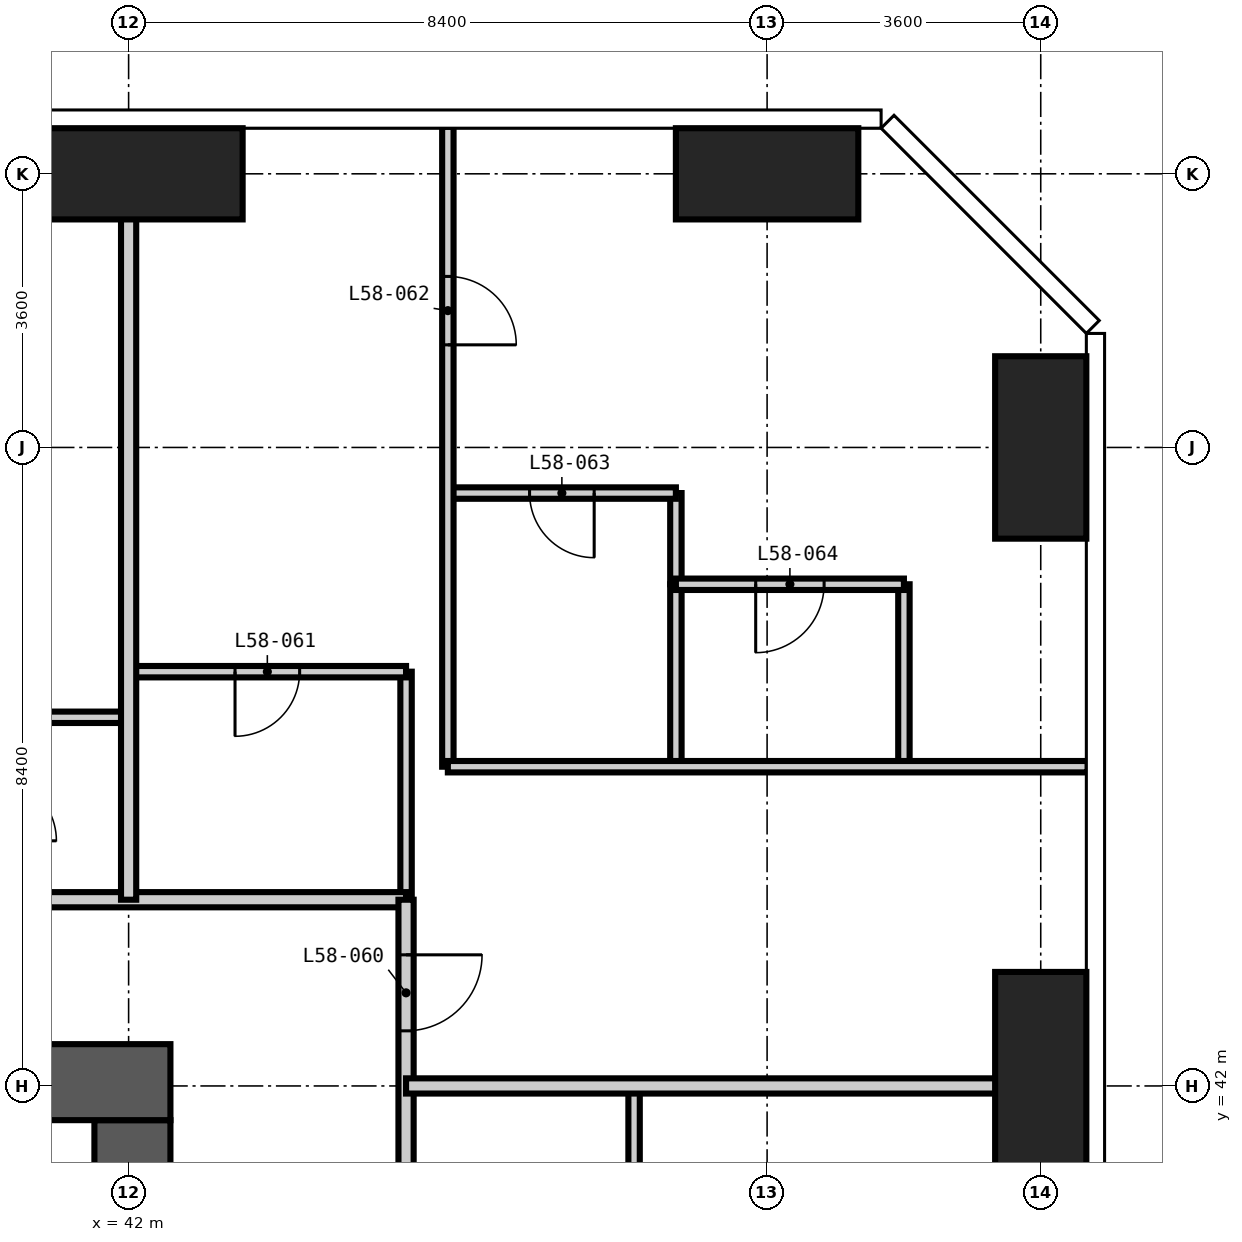
"""IFC4 building model, lengths in metres.
Left out: names, types, materials, properties, quantities, classifications, styles, units other than length and angle.
Written with IfcOpenShell. Run it as: python <this file> out.ifc"""

import sys

from ifc_helpers import new_model, si_unit, direction, frame, frame_2d, origin, origin_2d, place, context, subcontext, project, spatial, rectangle, extrude, element, fill, save


model = new_model("IFC4")
c1 = context("Model", 3, precision=1e-05, world=origin(), true_north=direction((0.0, 1.0)))
c2 = subcontext(c1, "Body", "Model", "MODEL_VIEW")
j1 = project(units=[si_unit("LENGTHUNIT", "METRE"), si_unit("PLANEANGLEUNIT", "RADIAN")], contexts=[c1])
p1 = place(None, origin())
s1 = spatial("IfcSite", under=j1, at=p1, CompositionType="ELEMENT")
p2 = place(p1, origin())
s2 = spatial("IfcBuilding", under=s1, at=p2, CompositionType="ELEMENT")
p3 = place(p2, frame((0.0, 0.0, 225.6)))
s3 = spatial("IfcBuildingStorey", under=s2, at=p3, CompositionType="ELEMENT", Elevation=225.6)
p4 = place(p3, frame((42.0, 54.0, -0.35), z_axis=(0.0, 0.0, 1.0), x_axis=(1.0, 0.0, 0.0)))
e1 = element("IfcColumn", 1, at=p4, inside=s3, PredefinedType="COLUMN", context=c2, shape_type="SweptSolid", body=[
    extrude(rectangle(XDim=3.0, YDim=1.2, at=origin_2d()), origin(), (0.0, 0.0, 1.0), 3.9),
])
p5 = place(p3, frame((50.4, 54.0, -0.35), z_axis=(0.0, 0.0, 1.0), x_axis=(1.0, 0.0, 0.0)))
e2 = element("IfcColumn", 2, at=p5, inside=s3, PredefinedType="COLUMN", context=c2, shape_type="SweptSolid", body=[
    extrude(rectangle(XDim=2.4, YDim=1.2, at=origin_2d()), origin(), (0.0, 0.0, 1.0), 3.9),
])
p6 = place(p3, frame((54.0, 42.0, -0.35), z_axis=(0.0, 0.0, 1.0), x_axis=(1.0, 0.0, 0.0)))
e3 = element("IfcColumn", 3, at=p6, inside=s3, PredefinedType="COLUMN", context=c2, shape_type="SweptSolid", body=[
    extrude(rectangle(XDim=1.2, YDim=3.0, at=origin_2d()), origin(), (0.0, 0.0, 1.0), 3.9),
])
p7 = place(p3, frame((54.0, 50.4, -0.35), z_axis=(0.0, 0.0, 1.0), x_axis=(1.0, 0.0, 0.0)))
e4 = element("IfcColumn", 4, at=p7, inside=s3, PredefinedType="COLUMN", context=c2, shape_type="SweptSolid", body=[
    extrude(rectangle(XDim=1.2, YDim=2.4, at=origin_2d()), origin(), (0.0, 0.0, 1.0), 3.9),
])
p8 = place(p3, frame((42.05, 17.25, -0.35), z_axis=(0.0, 0.0, 1.0), x_axis=(0.0, 1.0, 0.0)))
e5 = element("IfcWall", 5, at=p8, inside=s3, PredefinedType="SHEAR", context=c2, shape_type="SweptSolid", body=[
    extrude(rectangle(XDim=24.3, YDim=1.0, at=frame_2d((12.15, 0.0))), origin(), (0.0, 0.0, 1.0), 3.9),
])
p9 = place(p8, frame((0.35, 0.0, 0.35)))
e6 = element("IfcOpeningElement", 6, at=p9, cuts=e5, PredefinedType="OPENING", context=c2, shape_type="SweptSolid", body=[
    extrude(rectangle(XDim=1.2, YDim=2.2, at=frame_2d((0.6, 1.1))), frame((0.0, 0.51, 0.0), z_axis=(0.0, -1.0, 0.0), x_axis=(1.0, 0.0, 0.0)), (0.0, 0.0, 1.0), 1.02),
])
p10 = place(p8, frame((11.25, 0.0, 0.35)))
e7 = element("IfcOpeningElement", 7, at=p10, cuts=e5, PredefinedType="OPENING", context=c2, shape_type="SweptSolid", body=[
    extrude(rectangle(XDim=1.8, YDim=2.2, at=frame_2d((0.9, 1.1))), frame((0.0, 0.51, 0.0), z_axis=(0.0, -1.0, 0.0), x_axis=(1.0, 0.0, 0.0)), (0.0, 0.0, 1.0), 1.02),
])
p11 = place(p8, frame((20.05, 0.0, 0.35)))
e8 = element("IfcOpeningElement", 8, at=p11, cuts=e5, PredefinedType="OPENING", context=c2, shape_type="SweptSolid", body=[
    extrude(rectangle(XDim=1.0, YDim=2.1, at=frame_2d((0.5, 1.05))), frame((0.0, 0.51, 0.0), z_axis=(0.0, -1.0, 0.0), x_axis=(1.0, 0.0, 0.0)), (0.0, 0.0, 1.0), 1.02),
])
p12 = place(p3, frame((42.55, 42.05, -0.35), z_axis=(0.0, 0.0, 1.0), x_axis=(-1.0, 0.0, 0.0)))
e9 = element("IfcWall", 9, at=p12, inside=s3, PredefinedType="SHEAR", context=c2, shape_type="SweptSolid", body=[
    extrude(rectangle(XDim=18.125, YDim=1.0, at=frame_2d((9.062, 0.0))), origin(), (0.0, 0.0, 1.0), 3.9),
])
p13 = place(p12, frame((10.45, 0.0, 0.35)))
e10 = element("IfcOpeningElement", 10, at=p13, cuts=e9, PredefinedType="OPENING", context=c2, shape_type="SweptSolid", body=[
    extrude(rectangle(XDim=1.2, YDim=2.2, at=frame_2d((0.6, 1.1))), frame((0.0, 0.51, 0.0), z_axis=(0.0, -1.0, 0.0), x_axis=(1.0, 0.0, 0.0)), (0.0, 0.0, 1.0), 1.02),
])
p14 = place(p3, frame((45.65, 44.45, 0.0), z_axis=(0.0, 0.0, 1.0), x_axis=(0.0, 1.0, 0.0)))
e11 = element("IfcWall", 11, at=p14, inside=s3, PredefinedType="PARTITIONING", context=c2, shape_type="SweptSolid", body=[
    extrude(rectangle(XDim=3.0, YDim=0.15, at=frame_2d((1.5, 0.0))), origin(), (0.0, 0.0, 1.0), 3.55),
])
p15 = place(p3, frame((48.65, 39.6, 0.0), z_axis=(0.0, 0.0, 1.0), x_axis=(0.0, 1.0, 0.0)))
e12 = element("IfcWall", 12, at=p15, inside=s3, PredefinedType="PARTITIONING", context=c2, shape_type="SweptSolid", body=[
    extrude(rectangle(XDim=2.4, YDim=0.15, at=frame_2d((1.2, 0.0))), origin(), (0.0, 0.0, 1.0), 3.55),
])
p16 = place(p3, frame((49.2, 48.6, 0.0), z_axis=(0.0, 0.0, 1.0), x_axis=(0.0, 1.0, 0.0)))
e13 = element("IfcWall", 13, at=p16, inside=s3, PredefinedType="PARTITIONING", context=c2, shape_type="SweptSolid", body=[
    extrude(rectangle(XDim=1.2, YDim=0.15, at=frame_2d((0.6, 0.0))), origin(), (0.0, 0.0, 1.0), 3.55),
])
p17 = place(p3, frame((40.2, 46.85, 0.0), z_axis=(0.0, 0.0, 1.0), x_axis=(1.0, 0.0, 0.0)))
e14 = element("IfcWall", 14, at=p17, inside=s3, PredefinedType="PARTITIONING", context=c2, shape_type="SweptSolid", body=[
    extrude(rectangle(XDim=1.8, YDim=0.15, at=frame_2d((0.9, 0.0))), origin(), (0.0, 0.0, 1.0), 3.55),
])
p18 = place(p3, frame((42.0, 47.45, 0.0), z_axis=(0.0, 0.0, 1.0), x_axis=(1.0, 0.0, 0.0)))
e15 = element("IfcWall", 15, at=p18, inside=s3, PredefinedType="PARTITIONING", context=c2, shape_type="SweptSolid", body=[
    extrude(rectangle(XDim=3.65, YDim=0.15, at=frame_2d((1.825, 0.0))), origin(), (0.0, 0.0, 1.0), 3.55),
])
p19 = place(p18, frame((1.4, 0.0, 0.0)))
e16 = element("IfcOpeningElement", 16, at=p19, cuts=e15, PredefinedType="OPENING", context=c2, shape_type="SweptSolid", body=[
    extrude(rectangle(XDim=0.85, YDim=2.1, at=frame_2d((0.425, 1.05))), frame((0.0, 0.085, 0.0), z_axis=(0.0, -1.0, 0.0), x_axis=(1.0, 0.0, 0.0)), (0.0, 0.0, 1.0), 0.17),
])
p20 = place(p3, frame((46.2, 49.8, 0.0), z_axis=(0.0, 0.0, 1.0), x_axis=(1.0, 0.0, 0.0)))
e17 = element("IfcWall", 17, at=p20, inside=s3, PredefinedType="PARTITIONING", context=c2, shape_type="SweptSolid", body=[
    extrude(rectangle(XDim=3.0, YDim=0.15, at=frame_2d((1.5, 0.0))), origin(), (0.0, 0.0, 1.0), 3.55),
])
p21 = place(p20, frame((1.075, 0.0, 0.0)))
e18 = element("IfcOpeningElement", 18, at=p21, cuts=e17, PredefinedType="OPENING", context=c2, shape_type="SweptSolid", body=[
    extrude(rectangle(XDim=0.85, YDim=2.1, at=frame_2d((0.425, 1.05))), frame((0.0, 0.085, 0.0), z_axis=(0.0, -1.0, 0.0), x_axis=(1.0, 0.0, 0.0)), (0.0, 0.0, 1.0), 0.17),
])
p22 = place(p3, frame((21.925, 44.45, 0.0), z_axis=(0.0, 0.0, 1.0), x_axis=(1.0, 0.0, 0.0)))
e19 = element("IfcWall", 19, at=p22, inside=s3, PredefinedType="PARTITIONING", context=c2, shape_type="SweptSolid", body=[
    extrude(rectangle(XDim=23.725, YDim=0.2, at=frame_2d((11.862, 0.0))), origin(), (0.0, 0.0, 1.0), 3.55),
])
p23 = place(p22, frame((5.775, 0.0, 0.0)))
e20 = element("IfcOpeningElement", 20, at=p23, cuts=e19, PredefinedType="OPENING", context=c2, shape_type="SweptSolid", body=[
    extrude(rectangle(XDim=1.0, YDim=2.2, at=frame_2d((0.5, 1.1))), frame((0.0, 0.11, 0.0), z_axis=(0.0, -1.0, 0.0), x_axis=(1.0, 0.0, 0.0)), (0.0, 0.0, 1.0), 0.22),
])
p24 = place(p22, frame((16.575, 0.0, 0.0)))
e21 = element("IfcOpeningElement", 21, at=p24, cuts=e19, PredefinedType="OPENING", context=c2, shape_type="SweptSolid", body=[
    extrude(rectangle(XDim=1.0, YDim=2.2, at=frame_2d((0.5, 1.1))), frame((0.0, 0.11, 0.0), z_axis=(0.0, -1.0, 0.0), x_axis=(1.0, 0.0, 0.0)), (0.0, 0.0, 1.0), 0.22),
])
p25 = place(p3, frame((45.65, 44.45, 0.0), z_axis=(0.0, 0.0, 1.0), x_axis=(0.0, -1.0, 0.0)))
e22 = element("IfcWall", 22, at=p25, inside=s3, PredefinedType="PARTITIONING", context=c2, shape_type="SweptSolid", body=[
    extrude(rectangle(XDim=15.05, YDim=0.2, at=frame_2d((7.525, 0.0))), origin(), (0.0, 0.0, 1.0), 3.55),
])
p26 = place(p25, frame((8.25, 0.0, 0.0)))
e23 = element("IfcOpeningElement", 23, at=p26, cuts=e22, PredefinedType="OPENING", context=c2, shape_type="SweptSolid", body=[
    extrude(rectangle(XDim=1.0, YDim=2.2, at=frame_2d((0.5, 1.1))), frame((0.0, 0.11, 0.0), z_axis=(0.0, -1.0, 0.0), x_axis=(1.0, 0.0, 0.0)), (0.0, 0.0, 1.0), 0.22),
])
p27 = place(p25, frame((0.725, 0.0, 0.0)))
e24 = element("IfcOpeningElement", 24, at=p27, cuts=e22, PredefinedType="OPENING", context=c2, shape_type="SweptSolid", body=[
    extrude(rectangle(XDim=1.0, YDim=2.2, at=frame_2d((0.5, 1.1))), frame((0.0, 0.11, 0.0), z_axis=(0.0, -1.0, 0.0), x_axis=(1.0, 0.0, 0.0)), (0.0, 0.0, 1.0), 0.22),
])
p28 = place(p3, frame((42.0, 44.45, 0.0), z_axis=(0.0, 0.0, 1.0), x_axis=(0.0, 1.0, 0.0)))
e25 = element("IfcWall", 25, at=p28, inside=s3, PredefinedType="PARTITIONING", context=c2, shape_type="SweptSolid", body=[
    extrude(rectangle(XDim=10.168, YDim=0.2, at=frame_2d((5.084, 0.0))), origin(), (0.0, 0.0, 1.0), 3.55),
])
p29 = place(p3, frame((45.65, 42.0, 0.0), z_axis=(0.0, 0.0, 1.0), x_axis=(1.0, 0.0, 0.0)))
e26 = element("IfcWall", 26, at=p29, inside=s3, PredefinedType="PARTITIONING", context=c2, shape_type="SweptSolid", body=[
    extrude(rectangle(XDim=8.968, YDim=0.2, at=frame_2d((4.484, 0.0))), origin(), (0.0, 0.0, 1.0), 3.55),
])
p30 = place(p3, frame((46.2, 46.2, 0.0), z_axis=(0.0, 0.0, 1.0), x_axis=(0.0, 1.0, 0.0)))
e27 = element("IfcWall", 27, at=p30, inside=s3, PredefinedType="PARTITIONING", context=c2, shape_type="SweptSolid", body=[
    extrude(rectangle(XDim=8.418, YDim=0.15, at=frame_2d((4.209, 0.0))), origin(), (0.0, 0.0, 1.0), 3.55),
])
p31 = place(p30, frame((5.55, 0.0, 0.0)))
e28 = element("IfcOpeningElement", 28, at=p31, cuts=e27, PredefinedType="OPENING", context=c2, shape_type="SweptSolid", body=[
    extrude(rectangle(XDim=0.9, YDim=2.1, at=frame_2d((0.45, 1.05))), frame((0.0, 0.085, 0.0), z_axis=(0.0, -1.0, 0.0), x_axis=(1.0, 0.0, 0.0)), (0.0, 0.0, 1.0), 0.17),
])
for number, where, z_axis, x_axis in (
    (29, (49.2, 46.2, 0.0), (0.0, 0.0, 1.0), (0.0, 1.0, 0.0)),
    (30, (52.2, 46.2, 0.0), (0.0, 0.0, 1.0), (0.0, 1.0, 0.0)),
):
    element("IfcWall", number, at=place(p3, frame(where, z_axis=z_axis, x_axis=x_axis)), inside=s3, PredefinedType="PARTITIONING", context=c2, shape_type="SweptSolid", body=[
        extrude(rectangle(XDim=2.4, YDim=0.15, at=frame_2d((1.2, 0.0))), origin(), (0.0, 0.0, 1.0), 3.55),
    ])
p32 = place(p3, frame((46.2, 46.2, 0.0), z_axis=(0.0, 0.0, 1.0), x_axis=(1.0, 0.0, 0.0)))
e31 = element("IfcWall", 31, at=p32, inside=s3, PredefinedType="PARTITIONING", context=c2, shape_type="SweptSolid", body=[
    extrude(rectangle(XDim=8.418, YDim=0.15, at=frame_2d((4.209, 0.0))), origin(), (0.0, 0.0, 1.0), 3.55),
])
p33 = place(p3, frame((49.2, 48.6, 0.0), z_axis=(0.0, 0.0, 1.0), x_axis=(1.0, 0.0, 0.0)))
e32 = element("IfcWall", 32, at=p33, inside=s3, PredefinedType="PARTITIONING", context=c2, shape_type="SweptSolid", body=[
    extrude(rectangle(XDim=3.0, YDim=0.15, at=frame_2d((1.5, 0.0))), origin(), (0.0, 0.0, 1.0), 3.55),
])
p34 = place(p33, frame((1.05, 0.0, 0.0)))
e33 = element("IfcOpeningElement", 33, at=p34, cuts=e32, PredefinedType="OPENING", context=c2, shape_type="SweptSolid", body=[
    extrude(rectangle(XDim=0.9, YDim=2.1, at=frame_2d((0.45, 1.05))), frame((0.0, 0.085, 0.0), z_axis=(0.0, -1.0, 0.0), x_axis=(1.0, 0.0, 0.0)), (0.0, 0.0, 1.0), 0.17),
])
p35 = place(p27, origin())
e34 = element("IfcDoor", 34, at=p35, inside=s3, OperationType="SINGLE_SWING_LEFT", PredefinedType="DOOR", context=c2, shape_type="SweptSolid", body=[
    extrude(rectangle(XDim=1.0, YDim=2.2, at=frame_2d((0.5, 1.1))), frame((0.0, 0.025, 0.0), z_axis=(0.0, -1.0, 0.0), x_axis=(1.0, 0.0, 0.0)), (0.0, 0.0, 1.0), 0.05),
])
fill(e24, e34)
p36 = place(p19, frame((0.85, 0.0, 0.0), z_axis=(0.0, 0.0, 1.0), x_axis=(-1.0, 0.0, 0.0)))
e35 = element("IfcDoor", 35, at=p36, inside=s3, OperationType="SINGLE_SWING_RIGHT", PredefinedType="DOOR", context=c2, shape_type="SweptSolid", body=[
    extrude(rectangle(XDim=0.85, YDim=2.1, at=frame_2d((0.425, 1.05))), frame((0.0, 0.025, 0.0), z_axis=(0.0, -1.0, 0.0), x_axis=(1.0, 0.0, 0.0)), (0.0, 0.0, 1.0), 0.05),
])
fill(e16, e35)
p37 = place(p31, frame((0.9, 0.0, 0.0), z_axis=(0.0, 0.0, 1.0), x_axis=(-1.0, 0.0, 0.0)))
e36 = element("IfcDoor", 36, at=p37, inside=s3, OperationType="SINGLE_SWING_RIGHT", PredefinedType="DOOR", context=c2, shape_type="SweptSolid", body=[
    extrude(rectangle(XDim=0.9, YDim=2.1, at=frame_2d((0.45, 1.05))), frame((0.0, 0.025, 0.0), z_axis=(0.0, -1.0, 0.0), x_axis=(1.0, 0.0, 0.0)), (0.0, 0.0, 1.0), 0.05),
])
fill(e28, e36)
p38 = place(p21, frame((0.85, 0.0, 0.0), z_axis=(0.0, 0.0, 1.0), x_axis=(-1.0, 0.0, 0.0)))
e37 = element("IfcDoor", 37, at=p38, inside=s3, OperationType="SINGLE_SWING_LEFT", PredefinedType="DOOR", context=c2, shape_type="SweptSolid", body=[
    extrude(rectangle(XDim=0.85, YDim=2.1, at=frame_2d((0.425, 1.05))), frame((0.0, 0.025, 0.0), z_axis=(0.0, -1.0, 0.0), x_axis=(1.0, 0.0, 0.0)), (0.0, 0.0, 1.0), 0.05),
])
fill(e18, e37)
p39 = place(p34, frame((0.9, 0.0, 0.0), z_axis=(0.0, 0.0, 1.0), x_axis=(-1.0, 0.0, 0.0)))
e38 = element("IfcDoor", 38, at=p39, inside=s3, OperationType="SINGLE_SWING_RIGHT", PredefinedType="DOOR", context=c2, shape_type="SweptSolid", body=[
    extrude(rectangle(XDim=0.9, YDim=2.1, at=frame_2d((0.45, 1.05))), frame((0.0, 0.025, 0.0), z_axis=(0.0, -1.0, 0.0), x_axis=(1.0, 0.0, 0.0)), (0.0, 0.0, 1.0), 0.05),
])
fill(e33, e38)
save(model, sys.argv[1])
